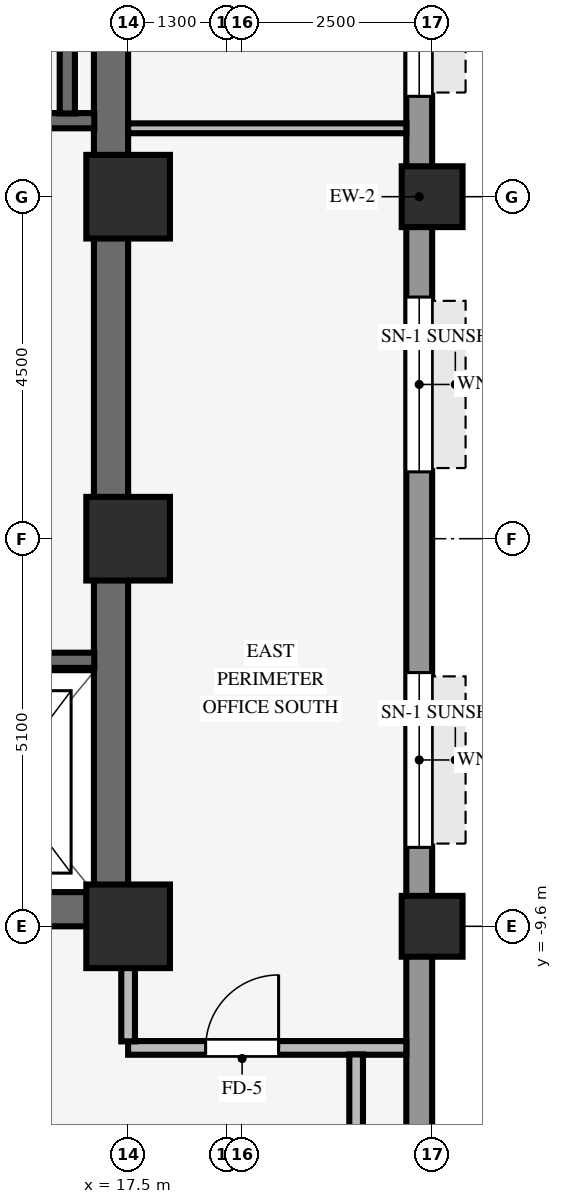
"""IFC4 building model, lengths in metres.
Left out: names, types, materials, properties, quantities, classifications, styles, units other than length and angle.
Written with IfcOpenShell. Run it as: python <this file> out.ifc"""

import sys

from ifc_helpers import new_model, si_unit, direction, frame, frame_2d, origin, origin_2d, place, context, subcontext, project, spatial, rectangle, hollow_rectangle, extrude, source, transform, mapped, element, fill, save


model = new_model("IFC4")
c1 = context("Model", 3, precision=1e-05, world=origin(), true_north=direction((0.0, 1.0)))
c2 = subcontext(c1, "Body", "Model", "MODEL_VIEW")
j1 = project(units=[si_unit("LENGTHUNIT", "METRE"), si_unit("PLANEANGLEUNIT", "RADIAN")], contexts=[c1])
p1 = place(None, origin())
s1 = spatial("IfcSite", under=j1, at=p1, CompositionType="ELEMENT")
p2 = place(p1, origin())
s2 = spatial("IfcBuilding", under=s1, at=p2, CompositionType="ELEMENT")
p3 = place(p2, frame((0.0, 0.0, 64.1)))
s3 = spatial("IfcBuildingStorey", under=s2, at=p3, CompositionType="ELEMENT", Elevation=64.1)
p4 = place(p3, frame((9.0, -9.375, 0.0), z_axis=(0.0, 0.0, 1.0), x_axis=(1.0, 0.0, 0.0)))
e1 = element("IfcWall", 1, at=p4, inside=s3, PredefinedType="SHEAR", context=c2, shape_type="SweptSolid", body=[
    extrude(rectangle(XDim=8.5, YDim=0.45, at=frame_2d((4.25, 0.0))), origin(), (0.0, 0.0, 1.0), 3.37),
])
p5 = place(p3, frame((17.275, -9.155, 0.0), z_axis=(0.0, 0.0, 1.0), x_axis=(0.0, 1.0, 0.0)))
e2 = element("IfcWall", 2, at=p5, inside=s3, PredefinedType="SHEAR", context=c2, shape_type="SweptSolid", body=[
    extrude(rectangle(XDim=18.31, YDim=0.45, at=frame_2d((9.155, 0.0))), origin(), (0.0, 0.0, 1.0), 3.37),
])
for number, where, z_axis, x_axis in (
    (3, (17.5, -9.6, 0.0), (0.0, 0.0, 1.0), (1.0, 0.0, 0.0)),
    (4, (17.5, -4.5, 0.0), (0.0, 0.0, 1.0), (1.0, 0.0, 0.0)),
    (5, (17.5, 0.0, 0.0), (0.0, 0.0, 1.0), (1.0, 0.0, 0.0)),
):
    element("IfcColumn", number, at=place(p3, frame(where, z_axis=z_axis, x_axis=x_axis)), inside=s3, PredefinedType="COLUMN", context=c2, shape_type="SweptSolid", body=[
        extrude(rectangle(XDim=1.1, YDim=1.1, at=origin_2d()), origin(), (0.0, 0.0, 1.0), 3.37),
    ])
for number, where, z_axis, x_axis in (
    (6, (21.5, -9.6, 0.0), (0.0, 0.0, 1.0), (1.0, 0.0, 0.0)),
    (7, (21.5, 0.0, 0.0), (0.0, 0.0, 1.0), (1.0, 0.0, 0.0)),
):
    element("IfcColumn", number, at=place(p3, frame(where, z_axis=z_axis, x_axis=x_axis)), inside=s3, PredefinedType="COLUMN", context=c2, shape_type="SweptSolid", body=[
        extrude(hollow_rectangle(XDim=0.8, YDim=0.8, WallThickness=0.055, InnerFilletRadius=0.055, OuterFilletRadius=0.11, at=origin_2d()), origin(), (0.0, 0.0, 1.0), 3.37),
    ])
p6 = place(p3, frame((21.33, -20.764, 0.0), z_axis=(0.0, 0.0, 1.0), x_axis=(0.0, 1.0, 0.0)))
e8 = element("IfcWall", 8, at=p6, inside=s3, PredefinedType="STANDARD", context=c2, shape_type="SweptSolid", body=[
    extrude(rectangle(XDim=41.528, YDim=0.34, at=frame_2d((20.764, 0.0))), origin(), (0.0, 0.0, 1.0), 2.705),
])
p7 = place(p6, frame((12.202, 0.0, 0.8)))
e9 = element("IfcOpeningElement", 9, at=p7, cuts=e8, PredefinedType="OPENING", context=c2, shape_type="SweptSolid", body=[
    extrude(rectangle(XDim=2.3, YDim=1.62, at=frame_2d((1.15, 0.81))), frame((0.0, 0.18, 0.0), z_axis=(0.0, -1.0, 0.0), x_axis=(1.0, 0.0, 0.0)), (0.0, 0.0, 1.0), 0.36),
])
p8 = place(p6, frame((17.144, 0.0, 0.8)))
e10 = element("IfcOpeningElement", 10, at=p8, cuts=e8, PredefinedType="OPENING", context=c2, shape_type="SweptSolid", body=[
    extrude(rectangle(XDim=2.3, YDim=1.62, at=frame_2d((1.15, 0.81))), frame((0.0, 0.18, 0.0), z_axis=(0.0, -1.0, 0.0), x_axis=(1.0, 0.0, 0.0)), (0.0, 0.0, 1.0), 0.36),
])
p9 = place(p6, frame((22.084, 0.0, 0.8)))
e11 = element("IfcOpeningElement", 11, at=p9, cuts=e8, PredefinedType="OPENING", context=c2, shape_type="SweptSolid", body=[
    extrude(rectangle(XDim=2.3, YDim=1.62, at=frame_2d((1.15, 0.81))), frame((0.0, 0.18, 0.0), z_axis=(0.0, -1.0, 0.0), x_axis=(1.0, 0.0, 0.0)), (0.0, 0.0, 1.0), 0.36),
])
p10 = place(p6, frame((27.025, 0.0, 0.8)))
e12 = element("IfcOpeningElement", 12, at=p10, cuts=e8, PredefinedType="OPENING", context=c2, shape_type="SweptSolid", body=[
    extrude(rectangle(XDim=2.3, YDim=1.62, at=frame_2d((1.15, 0.81))), frame((0.0, 0.18, 0.0), z_axis=(0.0, -1.0, 0.0), x_axis=(1.0, 0.0, 0.0)), (0.0, 0.0, 1.0), 0.36),
])
p11 = place(p3, frame((13.535, 1.0, 0.0), z_axis=(0.0, 0.0, 1.0), x_axis=(1.0, 0.0, 0.0)))
e13 = element("IfcWall", 13, at=p11, inside=s3, PredefinedType="SHEAR", context=c2, shape_type="SweptSolid", body=[
    extrude(rectangle(XDim=3.52, YDim=0.2, at=frame_2d((1.76, 0.0))), origin(), (0.0, 0.0, 1.0), 3.37),
])
p12 = place(p3, frame((16.7, 1.095, 0.0), z_axis=(0.0, 0.0, 1.0), x_axis=(0.0, 1.0, 0.0)))
e14 = element("IfcWall", 14, at=p12, inside=s3, PredefinedType="SHEAR", context=c2, shape_type="SweptSolid", body=[
    extrude(rectangle(XDim=8.06, YDim=0.2, at=frame_2d((4.03, 0.0))), origin(), (0.0, 0.0, 1.0), 3.37),
])
p13 = place(p3, frame((14.645, -6.1, 0.0), z_axis=(0.0, 0.0, 1.0), x_axis=(1.0, 0.0, 0.0)))
e15 = element("IfcWall", 15, at=p13, inside=s3, PredefinedType="SHEAR", context=c2, shape_type="SweptSolid", body=[
    extrude(rectangle(XDim=2.41, YDim=0.2, at=frame_2d((1.205, 0.0))), origin(), (0.0, 0.0, 1.0), 3.37),
])
p14 = place(p3, frame((17.5, -11.2, 0.0), z_axis=(0.0, 0.0, 1.0), x_axis=(1.0, 0.0, 0.0)))
e16 = element("IfcWall", 16, at=p14, inside=s3, PredefinedType="PARTITIONING", context=c2, shape_type="SweptSolid", body=[
    extrude(rectangle(XDim=3.66, YDim=0.18, at=frame_2d((1.83, 0.0))), origin(), (0.0, 0.0, 1.0), 3.36),
])
p15 = place(p14, frame((1.02, 0.0, 0.0)))
e17 = element("IfcOpeningElement", 17, at=p15, cuts=e16, PredefinedType="OPENING", context=c2, shape_type="SweptSolid", body=[
    extrude(rectangle(XDim=0.96, YDim=2.1, at=frame_2d((0.48, 1.05))), frame((0.0, 0.1, 0.0), z_axis=(0.0, -1.0, 0.0), x_axis=(1.0, 0.0, 0.0)), (0.0, 0.0, 1.0), 0.2),
])
p16 = place(p3, frame((17.5, 0.9, 0.0), z_axis=(0.0, 0.0, 1.0), x_axis=(1.0, 0.0, 0.0)))
e18 = element("IfcWall", 18, at=p16, inside=s3, PredefinedType="PARTITIONING", context=c2, shape_type="SweptSolid", body=[
    extrude(rectangle(XDim=3.66, YDim=0.13, at=frame_2d((1.83, 0.0))), origin(), (0.0, 0.0, 1.0), 3.36),
])
p17 = place(p3, frame((17.5, -11.114, 0.0), z_axis=(0.0, 0.0, 1.0), x_axis=(0.0, 1.0, 0.0)))
e19 = element("IfcWall", 19, at=p17, inside=s3, PredefinedType="PARTITIONING", context=c2, shape_type="SweptSolid", body=[
    extrude(rectangle(XDim=0.968, YDim=0.18, at=frame_2d((0.484, 0.0))), origin(), (0.0, 0.0, 1.0), 2.738),
])
p18 = place(p3, frame((20.5, -13.514, 0.0), z_axis=(0.0, 0.0, 1.0), x_axis=(0.0, 1.0, 0.0)))
e20 = element("IfcWall", 20, at=p18, inside=s3, PredefinedType="PARTITIONING", context=c2, shape_type="SweptSolid", body=[
    extrude(rectangle(XDim=2.228, YDim=0.18, at=frame_2d((1.114, 0.0))), origin(), (0.0, 0.0, 1.0), 3.36),
])
m1 = source(origin(), c2, "Body", "SweptSolid", [
    extrude(rectangle(XDim=2.3, YDim=1.62, at=frame_2d((1.15, 0.81))), frame((0.0, 0.03, 0.0), z_axis=(0.0, -1.0, 0.0), x_axis=(1.0, 0.0, 0.0)), (0.0, 0.0, 1.0), 0.06),
])
p19 = place(p7, origin())
e21 = element("IfcWindow", 21, at=p19, inside=s3, PartitioningType="SINGLE_PANEL", PredefinedType="WINDOW", context=c2, shape_type="MappedRepresentation", body=[
    mapped(m1, transform((0.0, 0.0, 0.0), scale=1.0)),
])
fill(e9, e21)
p20 = place(p8, origin())
e22 = element("IfcWindow", 22, at=p20, inside=s3, PartitioningType="SINGLE_PANEL", PredefinedType="WINDOW", context=c2, shape_type="MappedRepresentation", body=[
    mapped(m1, transform((0.0, 0.0, 0.0), scale=1.0)),
])
fill(e10, e22)
p21 = place(p9, origin())
e23 = element("IfcWindow", 23, at=p21, inside=s3, PartitioningType="SINGLE_PANEL", PredefinedType="WINDOW", context=c2, shape_type="MappedRepresentation", body=[
    mapped(m1, transform((0.0, 0.0, 0.0), scale=1.0)),
])
fill(e11, e23)
m2 = source(origin(), c2, "Body", "SweptSolid", [
    extrude(rectangle(XDim=0.96, YDim=2.1, at=frame_2d((0.48, 1.05))), frame((0.0, 0.025, 0.0), z_axis=(0.0, -1.0, 0.0), x_axis=(1.0, 0.0, 0.0)), (0.0, 0.0, 1.0), 0.05),
])
p22 = place(p15, origin())
e24 = element("IfcDoor", 24, at=p22, inside=s3, OperationType="SINGLE_SWING_RIGHT", PredefinedType="DOOR", context=c2, shape_type="MappedRepresentation", body=[
    mapped(m2, transform((0.0, 0.0, 0.0), scale=1.0)),
])
fill(e17, e24)
save(model, sys.argv[1])
